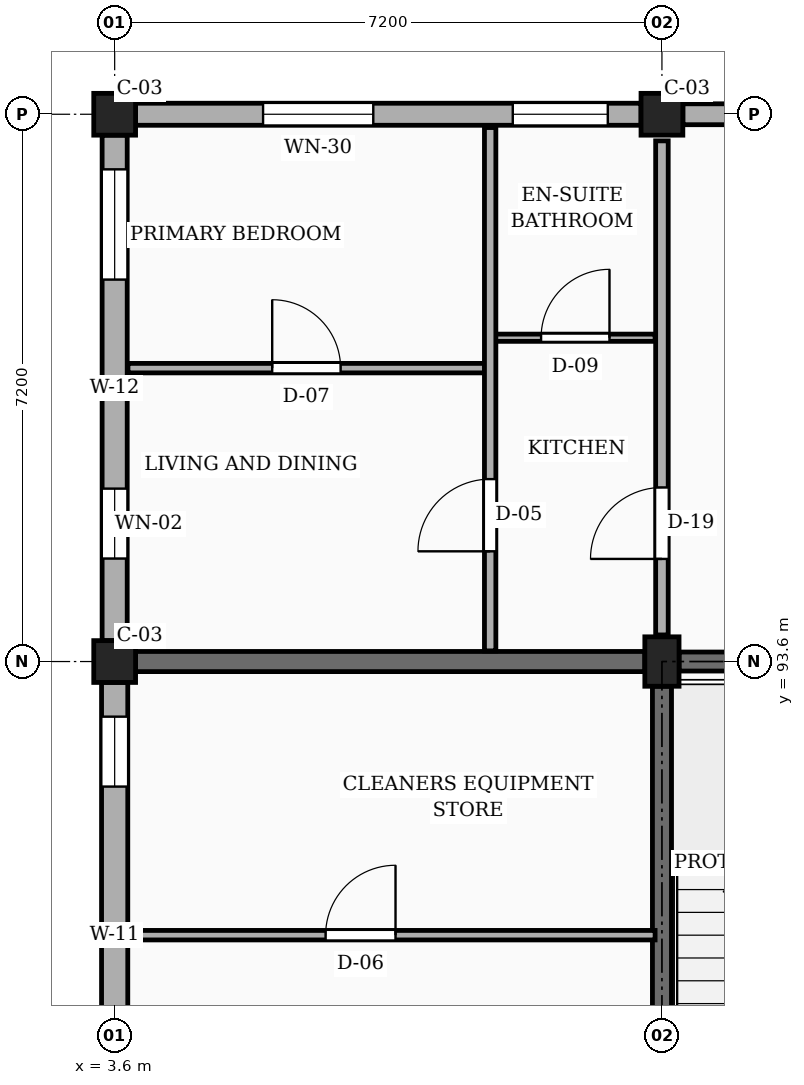
"""IFC4 building model, lengths in metres.
Left out: names, types, materials, properties, quantities, classifications, styles, units other than length and angle.
Written with IfcOpenShell. Run it as: python <this file> out.ifc"""

import sys

from ifc_helpers import new_model, si_unit, direction, frame, frame_2d, origin, origin_2d, place, context, subcontext, project, spatial, rectangle, extrude, element, fill, save


model = new_model("IFC4")
c1 = context("Model", 3, precision=1e-05, world=origin(), true_north=direction((0.0, 1.0)))
c2 = subcontext(c1, "Body", "Model", "MODEL_VIEW")
j1 = project(units=[si_unit("LENGTHUNIT", "METRE"), si_unit("PLANEANGLEUNIT", "RADIAN")], contexts=[c1])
p1 = place(None, origin())
s1 = spatial("IfcSite", under=j1, at=p1, CompositionType="ELEMENT")
p2 = place(p1, origin())
s2 = spatial("IfcBuilding", under=s1, at=p2, CompositionType="ELEMENT")
p3 = place(p2, frame((0.0, 0.0, 10.8)))
s3 = spatial("IfcBuildingStorey", under=s2, at=p3, CompositionType="ELEMENT", Elevation=10.8)
for number, where, z_axis, x_axis in (
    (1, (3.6, 93.6, 0.0), (0.0, 0.0, 1.0), (1.0, 0.0, 0.0)),
    (2, (3.6, 100.8, 0.0), (0.0, 0.0, 1.0), (1.0, 0.0, 0.0)),
):
    element("IfcColumn", number, at=place(p3, frame(where, z_axis=z_axis, x_axis=x_axis)), inside=s3, PredefinedType="COLUMN", context=c2, shape_type="SweptSolid", body=[
        extrude(rectangle(XDim=0.55, YDim=0.55, at=origin_2d()), origin(), (0.0, 0.0, 1.0), 3.15),
    ])
p4 = place(p3, frame((10.8, 93.6, 0.0), z_axis=(0.0, 0.0, 1.0), x_axis=(1.0, 0.0, 0.0)))
e3 = element("IfcColumn", 3, at=p4, inside=s3, PredefinedType="COLUMN", context=c2, shape_type="SweptSolid", body=[
    extrude(rectangle(XDim=0.45, YDim=0.65, at=origin_2d()), origin(), (0.0, 0.0, 1.0), 3.15),
])
p5 = place(p3, frame((10.8, 100.8, 0.0), z_axis=(0.0, 0.0, 1.0), x_axis=(1.0, 0.0, 0.0)))
e4 = element("IfcColumn", 4, at=p5, inside=s3, PredefinedType="COLUMN", context=c2, shape_type="SweptSolid", body=[
    extrude(rectangle(XDim=0.55, YDim=0.55, at=origin_2d()), origin(), (0.0, 0.0, 1.0), 3.15),
])
p6 = place(p3, frame((3.875, 93.6, 0.0), z_axis=(0.0, 0.0, 1.0), x_axis=(1.0, 0.0, 0.0)))
e5 = element("IfcWall", 5, at=p6, inside=s3, PredefinedType="SOLIDWALL", context=c2, shape_type="SweptSolid", body=[
    extrude(rectangle(XDim=6.7, YDim=0.265, at=frame_2d((3.35, 0.0))), origin(), (0.0, 0.0, 1.0), 2.21),
])
p7 = place(p3, frame((17.725, 100.8, 0.0), z_axis=(0.0, 0.0, 1.0), x_axis=(-1.0, 0.0, 0.0)))
e6 = element("IfcWall", 6, at=p7, inside=s3, PredefinedType="SOLIDWALL", context=c2, shape_type="SweptSolid", body=[
    extrude(rectangle(XDim=6.65, YDim=0.275, at=frame_2d((3.325, 0.0))), origin(), (0.0, 0.0, 1.0), 2.48),
])
p8 = place(p7, frame((0.45, 0.0, 0.78)))
e7 = element("IfcOpeningElement", 7, at=p8, cuts=e6, PredefinedType="OPENING", context=c2, shape_type="SweptSolid", body=[
    extrude(rectangle(XDim=1.05, YDim=1.44, at=frame_2d((0.525, 0.72))), frame((0.0, 0.147, 0.0), z_axis=(0.0, -1.0, 0.0), x_axis=(1.0, 0.0, 0.0)), (0.0, 0.0, 1.0), 0.295),
])
p9 = place(p7, frame((4.65, 0.0, 0.78)))
e8 = element("IfcOpeningElement", 8, at=p9, cuts=e6, PredefinedType="OPENING", context=c2, shape_type="SweptSolid", body=[
    extrude(rectangle(XDim=1.25, YDim=1.44, at=frame_2d((0.625, 0.72))), frame((0.0, 0.147, 0.0), z_axis=(0.0, -1.0, 0.0), x_axis=(1.0, 0.0, 0.0)), (0.0, 0.0, 1.0), 0.295),
])
p10 = place(p3, frame((10.525, 100.8, 0.0), z_axis=(0.0, 0.0, 1.0), x_axis=(-1.0, 0.0, 0.0)))
e9 = element("IfcWall", 9, at=p10, inside=s3, PredefinedType="SOLIDWALL", context=c2, shape_type="SweptSolid", body=[
    extrude(rectangle(XDim=6.65, YDim=0.29, at=frame_2d((3.325, 0.0))), origin(), (0.0, 0.0, 1.0), 2.48),
])
p11 = place(p10, frame((0.438, 0.0, 0.78)))
e10 = element("IfcOpeningElement", 10, at=p11, cuts=e9, PredefinedType="OPENING", context=c2, shape_type="SweptSolid", body=[
    extrude(rectangle(XDim=1.25, YDim=1.44, at=frame_2d((0.625, 0.72))), frame((0.0, 0.155, 0.0), z_axis=(0.0, -1.0, 0.0), x_axis=(1.0, 0.0, 0.0)), (0.0, 0.0, 1.0), 0.31),
])
p12 = place(p10, frame((3.522, 0.0, 0.78)))
e11 = element("IfcOpeningElement", 11, at=p12, cuts=e9, PredefinedType="OPENING", context=c2, shape_type="SweptSolid", body=[
    extrude(rectangle(XDim=1.45, YDim=1.44, at=frame_2d((0.725, 0.72))), frame((0.0, 0.155, 0.0), z_axis=(0.0, -1.0, 0.0), x_axis=(1.0, 0.0, 0.0)), (0.0, 0.0, 1.0), 0.31),
])
p13 = place(p3, frame((3.6, 100.525, 0.0), z_axis=(0.0, 0.0, 1.0), x_axis=(0.0, -1.0, 0.0)))
e12 = element("IfcWall", 12, at=p13, inside=s3, PredefinedType="SOLIDWALL", context=c2, shape_type="SweptSolid", body=[
    extrude(rectangle(XDim=6.65, YDim=0.33, at=frame_2d((3.325, 0.0))), origin(), (0.0, 0.0, 1.0), 2.48),
])
p14 = place(p13, frame((0.45, 0.0, 0.78)))
e13 = element("IfcOpeningElement", 13, at=p14, cuts=e12, PredefinedType="OPENING", context=c2, shape_type="SweptSolid", body=[
    extrude(rectangle(XDim=1.45, YDim=1.44, at=frame_2d((0.725, 0.72))), frame((0.0, 0.175, 0.0), z_axis=(0.0, -1.0, 0.0), x_axis=(1.0, 0.0, 0.0)), (0.0, 0.0, 1.0), 0.35),
])
p15 = place(p13, frame((4.65, 0.0, 0.78)))
e14 = element("IfcOpeningElement", 14, at=p15, cuts=e12, PredefinedType="OPENING", context=c2, shape_type="SweptSolid", body=[
    extrude(rectangle(XDim=0.92, YDim=1.15, at=frame_2d((0.46, 0.575))), frame((0.0, 0.175, 0.0), z_axis=(0.0, -1.0, 0.0), x_axis=(1.0, 0.0, 0.0)), (0.0, 0.0, 1.0), 0.35),
])
p16 = place(p3, frame((3.6, 93.325, 0.0), z_axis=(0.0, 0.0, 1.0), x_axis=(0.0, -1.0, 0.0)))
e15 = element("IfcWall", 15, at=p16, inside=s3, PredefinedType="SOLIDWALL", context=c2, shape_type="SweptSolid", body=[
    extrude(rectangle(XDim=6.65, YDim=0.345, at=frame_2d((3.325, 0.0))), origin(), (0.0, 0.0, 1.0), 2.48),
])
p17 = place(p16, frame((0.45, 0.0, 0.78)))
e16 = element("IfcOpeningElement", 16, at=p17, cuts=e15, PredefinedType="OPENING", context=c2, shape_type="SweptSolid", body=[
    extrude(rectangle(XDim=0.92, YDim=1.15, at=frame_2d((0.46, 0.575))), frame((0.0, 0.183, 0.0), z_axis=(0.0, -1.0, 0.0), x_axis=(1.0, 0.0, 0.0)), (0.0, 0.0, 1.0), 0.365),
])
p18 = place(p16, frame((4.65, 0.0, 0.78)))
e17 = element("IfcOpeningElement", 17, at=p18, cuts=e15, PredefinedType="OPENING", context=c2, shape_type="SweptSolid", body=[
    extrude(rectangle(XDim=1.08, YDim=1.15, at=frame_2d((0.54, 0.575))), frame((0.0, 0.183, 0.0), z_axis=(0.0, -1.0, 0.0), x_axis=(1.0, 0.0, 0.0)), (0.0, 0.0, 1.0), 0.365),
])
p19 = place(p3, frame((10.8, 86.725, 0.0), z_axis=(0.0, 0.0, 1.0), x_axis=(0.0, 1.0, 0.0)))
e18 = element("IfcWall", 18, at=p19, inside=s3, PredefinedType="SHEAR", context=c2, shape_type="SweptSolid", body=[
    extrude(rectangle(XDim=6.55, YDim=0.25, at=frame_2d((3.275, 0.0))), origin(), (0.0, 0.0, 1.0), 2.91),
])
p20 = place(p3, frame((11.025, 93.6, 0.0), z_axis=(0.0, 0.0, 1.0), x_axis=(1.0, 0.0, 0.0)))
e19 = element("IfcWall", 19, at=p20, inside=s3, PredefinedType="SHEAR", context=c2, shape_type="SweptSolid", body=[
    extrude(rectangle(XDim=6.75, YDim=0.25, at=frame_2d((3.375, 0.0))), origin(), (0.0, 0.0, 1.0), 2.91),
])
p21 = place(p3, frame((10.8, 93.95, 0.0), z_axis=(0.0, 0.0, 1.0), x_axis=(0.0, 1.0, 0.0)))
e20 = element("IfcWall", 20, at=p21, inside=s3, PredefinedType="PARTITIONING", context=c2, shape_type="SweptSolid", body=[
    extrude(rectangle(XDim=6.5, YDim=0.165, at=frame_2d((3.25, 0.0))), origin(), (0.0, 0.0, 1.0), 2.26),
])
p22 = place(p21, frame((1.0, 0.0, 0.0)))
e21 = element("IfcOpeningElement", 21, at=p22, cuts=e20, PredefinedType="OPENING", context=c2, shape_type="SweptSolid", body=[
    extrude(rectangle(XDim=0.94, YDim=2.12, at=frame_2d((0.47, 1.06))), frame((0.0, 0.093, 0.0), z_axis=(0.0, -1.0, 0.0), x_axis=(1.0, 0.0, 0.0)), (0.0, 0.0, 1.0), 0.185),
])
p23 = place(p3, frame((3.775, 90.0, 0.0), z_axis=(0.0, 0.0, 1.0), x_axis=(1.0, 0.0, 0.0)))
e22 = element("IfcWall", 22, at=p23, inside=s3, PredefinedType="PARTITIONING", context=c2, shape_type="SweptSolid", body=[
    extrude(rectangle(XDim=6.935, YDim=0.125, at=frame_2d((3.468, 0.0))), origin(), (0.0, 0.0, 1.0), 2.345),
])
p24 = place(p23, frame((2.6, 0.0, 0.0)))
e23 = element("IfcOpeningElement", 23, at=p24, cuts=e22, PredefinedType="OPENING", context=c2, shape_type="SweptSolid", body=[
    extrude(rectangle(XDim=0.92, YDim=2.1, at=frame_2d((0.46, 1.05))), frame((0.0, 0.073, 0.0), z_axis=(0.0, -1.0, 0.0), x_axis=(1.0, 0.0, 0.0)), (0.0, 0.0, 1.0), 0.145),
])
p25 = place(p3, frame((3.775, 97.46, 0.0), z_axis=(0.0, 0.0, 1.0), x_axis=(1.0, 0.0, 0.0)))
e24 = element("IfcWall", 24, at=p25, inside=s3, PredefinedType="PARTITIONING", context=c2, shape_type="SweptSolid", body=[
    extrude(rectangle(XDim=4.695, YDim=0.125, at=frame_2d((2.348, 0.0))), origin(), (0.0, 0.0, 1.0), 2.345),
])
p26 = place(p25, frame((1.897, 0.0, 0.0)))
e25 = element("IfcOpeningElement", 25, at=p26, cuts=e24, PredefinedType="OPENING", context=c2, shape_type="SweptSolid", body=[
    extrude(rectangle(XDim=0.9, YDim=2.1, at=frame_2d((0.45, 1.05))), frame((0.0, 0.073, 0.0), z_axis=(0.0, -1.0, 0.0), x_axis=(1.0, 0.0, 0.0)), (0.0, 0.0, 1.0), 0.145),
])
p27 = place(p3, frame((8.61, 97.86, 0.0), z_axis=(0.0, 0.0, 1.0), x_axis=(1.0, 0.0, 0.0)))
e26 = element("IfcWall", 26, at=p27, inside=s3, PredefinedType="PARTITIONING", context=c2, shape_type="SweptSolid", body=[
    extrude(rectangle(XDim=2.1, YDim=0.095, at=frame_2d((1.05, 0.0))), origin(), (0.0, 0.0, 1.0), 2.345),
])
p28 = place(p27, frame((0.6, 0.0, 0.0)))
e27 = element("IfcOpeningElement", 27, at=p28, cuts=e26, PredefinedType="OPENING", context=c2, shape_type="SweptSolid", body=[
    extrude(rectangle(XDim=0.9, YDim=2.05, at=frame_2d((0.45, 1.025))), frame((0.0, 0.058, 0.0), z_axis=(0.0, -1.0, 0.0), x_axis=(1.0, 0.0, 0.0)), (0.0, 0.0, 1.0), 0.115),
])
p29 = place(p3, frame((8.54, 93.74, 0.0), z_axis=(0.0, 0.0, 1.0), x_axis=(0.0, 1.0, 0.0)))
e28 = element("IfcWall", 28, at=p29, inside=s3, PredefinedType="PARTITIONING", context=c2, shape_type="SweptSolid", body=[
    extrude(rectangle(XDim=6.885, YDim=0.15, at=frame_2d((3.442, 0.0))), origin(), (0.0, 0.0, 1.0), 2.345),
])
p30 = place(p29, frame((1.31, 0.0, 0.0)))
e29 = element("IfcOpeningElement", 29, at=p30, cuts=e28, PredefinedType="OPENING", context=c2, shape_type="SweptSolid", body=[
    extrude(rectangle(XDim=0.95, YDim=2.1, at=frame_2d((0.475, 1.05))), frame((0.0, 0.085, 0.0), z_axis=(0.0, -1.0, 0.0), x_axis=(1.0, 0.0, 0.0)), (0.0, 0.0, 1.0), 0.17),
])
p31 = place(p11, origin())
e30 = element("IfcWindow", 30, at=p31, inside=s3, PartitioningType="SINGLE_PANEL", PredefinedType="WINDOW", context=c2, shape_type="SweptSolid", body=[
    extrude(rectangle(XDim=1.25, YDim=1.44, at=frame_2d((0.625, 0.72))), frame((0.0, 0.03, 0.0), z_axis=(0.0, -1.0, 0.0), x_axis=(1.0, 0.0, 0.0)), (0.0, 0.0, 1.0), 0.06),
])
fill(e10, e30)
p32 = place(p12, origin())
e31 = element("IfcWindow", 31, at=p32, inside=s3, PartitioningType="SINGLE_PANEL", PredefinedType="WINDOW", context=c2, shape_type="SweptSolid", body=[
    extrude(rectangle(XDim=1.45, YDim=1.44, at=frame_2d((0.725, 0.72))), frame((0.0, 0.03, 0.0), z_axis=(0.0, -1.0, 0.0), x_axis=(1.0, 0.0, 0.0)), (0.0, 0.0, 1.0), 0.06),
])
fill(e11, e31)
p33 = place(p14, origin())
e32 = element("IfcWindow", 32, at=p33, inside=s3, PartitioningType="SINGLE_PANEL", PredefinedType="WINDOW", context=c2, shape_type="SweptSolid", body=[
    extrude(rectangle(XDim=1.45, YDim=1.44, at=frame_2d((0.725, 0.72))), frame((0.0, 0.03, 0.0), z_axis=(0.0, -1.0, 0.0), x_axis=(1.0, 0.0, 0.0)), (0.0, 0.0, 1.0), 0.06),
])
fill(e13, e32)
p34 = place(p15, origin())
e33 = element("IfcWindow", 33, at=p34, inside=s3, PartitioningType="SINGLE_PANEL", PredefinedType="WINDOW", context=c2, shape_type="SweptSolid", body=[
    extrude(rectangle(XDim=0.92, YDim=1.15, at=frame_2d((0.46, 0.575))), frame((0.0, 0.03, 0.0), z_axis=(0.0, -1.0, 0.0), x_axis=(1.0, 0.0, 0.0)), (0.0, 0.0, 1.0), 0.06),
])
fill(e14, e33)
p35 = place(p17, origin())
e34 = element("IfcWindow", 34, at=p35, inside=s3, PartitioningType="SINGLE_PANEL", PredefinedType="WINDOW", context=c2, shape_type="SweptSolid", body=[
    extrude(rectangle(XDim=0.92, YDim=1.15, at=frame_2d((0.46, 0.575))), frame((0.0, 0.03, 0.0), z_axis=(0.0, -1.0, 0.0), x_axis=(1.0, 0.0, 0.0)), (0.0, 0.0, 1.0), 0.06),
])
fill(e16, e34)
p36 = place(p22, origin())
e35 = element("IfcDoor", 35, at=p36, inside=s3, OperationType="SINGLE_SWING_LEFT", PredefinedType="DOOR", context=c2, shape_type="SweptSolid", body=[
    extrude(rectangle(XDim=0.94, YDim=2.12, at=frame_2d((0.47, 1.06))), frame((0.0, 0.025, 0.0), z_axis=(0.0, -1.0, 0.0), x_axis=(1.0, 0.0, 0.0)), (0.0, 0.0, 1.0), 0.05),
])
fill(e21, e35)
p37 = place(p24, origin())
e36 = element("IfcDoor", 36, at=p37, inside=s3, OperationType="SINGLE_SWING_RIGHT", PredefinedType="DOOR", context=c2, shape_type="SweptSolid", body=[
    extrude(rectangle(XDim=0.92, YDim=2.1, at=frame_2d((0.46, 1.05))), frame((0.0, 0.025, 0.0), z_axis=(0.0, -1.0, 0.0), x_axis=(1.0, 0.0, 0.0)), (0.0, 0.0, 1.0), 0.05),
])
fill(e23, e36)
p38 = place(p26, origin())
e37 = element("IfcDoor", 37, at=p38, inside=s3, OperationType="SINGLE_SWING_LEFT", PredefinedType="DOOR", context=c2, shape_type="SweptSolid", body=[
    extrude(rectangle(XDim=0.9, YDim=2.1, at=frame_2d((0.45, 1.05))), frame((0.0, 0.025, 0.0), z_axis=(0.0, -1.0, 0.0), x_axis=(1.0, 0.0, 0.0)), (0.0, 0.0, 1.0), 0.05),
])
fill(e25, e37)
p39 = place(p28, origin())
e38 = element("IfcDoor", 38, at=p39, inside=s3, OperationType="SINGLE_SWING_RIGHT", PredefinedType="DOOR", context=c2, shape_type="SweptSolid", body=[
    extrude(rectangle(XDim=0.9, YDim=2.05, at=frame_2d((0.45, 1.025))), frame((0.0, 0.025, 0.0), z_axis=(0.0, -1.0, 0.0), x_axis=(1.0, 0.0, 0.0)), (0.0, 0.0, 1.0), 0.05),
])
fill(e27, e38)
p40 = place(p30, origin())
e39 = element("IfcDoor", 39, at=p40, inside=s3, OperationType="SINGLE_SWING_LEFT", PredefinedType="DOOR", context=c2, shape_type="SweptSolid", body=[
    extrude(rectangle(XDim=0.95, YDim=2.1, at=frame_2d((0.475, 1.05))), frame((0.0, 0.025, 0.0), z_axis=(0.0, -1.0, 0.0), x_axis=(1.0, 0.0, 0.0)), (0.0, 0.0, 1.0), 0.05),
])
fill(e29, e39)
save(model, sys.argv[1])
